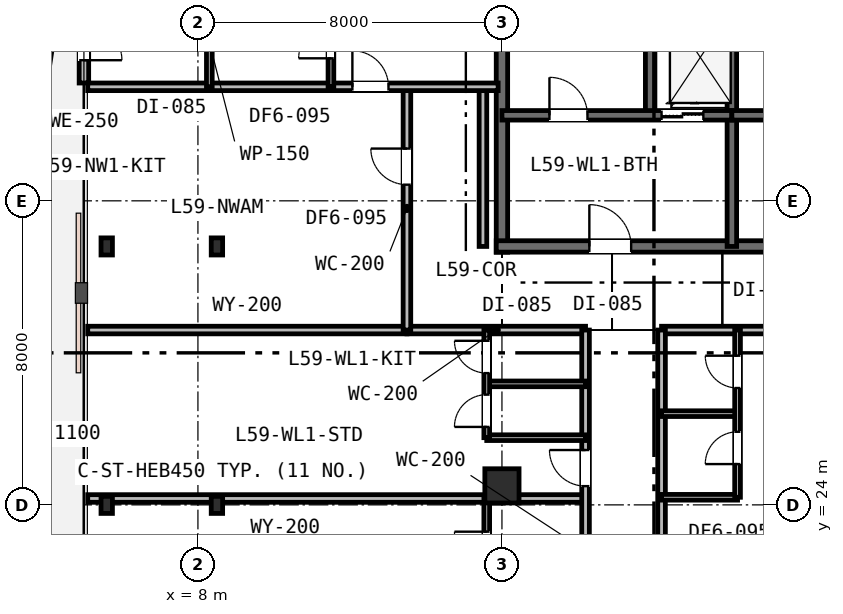
"""IFC4 building model, lengths in metres.
Left out: names, types, materials, properties, quantities, classifications, styles, units other than length and angle.
Written with IfcOpenShell. Run it as: python <this file> out.ifc"""

import sys

from ifc_helpers import new_model, si_unit, direction, frame, frame_2d, origin, origin_2d, place, context, subcontext, project, spatial, rectangle, i_section, extrude, element, fill, save


model = new_model("IFC4")
c1 = context("Model", 3, precision=1e-05, world=origin(), true_north=direction((0.0, 1.0)))
c2 = subcontext(c1, "Body", "Model", "MODEL_VIEW")
j1 = project(units=[si_unit("LENGTHUNIT", "METRE"), si_unit("PLANEANGLEUNIT", "RADIAN")], contexts=[c1])
p1 = place(None, origin())
s1 = spatial("IfcSite", under=j1, at=p1, CompositionType="ELEMENT")
p2 = place(p1, origin())
s2 = spatial("IfcBuilding", under=s1, at=p2, CompositionType="ELEMENT")
p3 = place(p2, frame((0.0, 0.0, 229.8)))
s3 = spatial("IfcBuildingStorey", under=s2, at=p3, CompositionType="ELEMENT", Elevation=229.8)
p4 = place(p3, frame((16.0, 30.65, 0.0), z_axis=(0.0, 0.0, 1.0), x_axis=(0.0, 1.0, 0.0)))
e1 = element("IfcWall", 1, at=p4, inside=s3, PredefinedType="SHEAR", context=c2, shape_type="SweptSolid", body=[
    extrude(rectangle(XDim=12.3, YDim=0.3, at=frame_2d((6.15, 0.0))), origin(), (0.0, 0.0, 1.0), 3.8),
])
p5 = place(p3, frame((15.85, 30.8, 0.0), z_axis=(0.0, 0.0, 1.0), x_axis=(1.0, 0.0, 0.0)))
e2 = element("IfcWall", 2, at=p5, inside=s3, PredefinedType="SHEAR", context=c2, shape_type="SweptSolid", body=[
    extrude(rectangle(XDim=11.2, YDim=0.3, at=frame_2d((5.6, 0.0))), origin(), (0.0, 0.0, 1.0), 3.8),
])
p6 = place(p5, frame((2.45, 0.0, 0.0)))
e3 = element("IfcOpeningElement", 3, at=p6, cuts=e2, PredefinedType="OPENING", context=c2, shape_type="SweptSolid", body=[
    extrude(rectangle(XDim=1.1, YDim=2.15, at=frame_2d((0.55, 1.075))), frame((0.0, 0.16, 0.0), z_axis=(0.0, -1.0, 0.0), x_axis=(1.0, 0.0, 0.0)), (0.0, 0.0, 1.0), 0.32),
])
p7 = place(p3, frame((19.9, 34.25, 0.0), z_axis=(0.0, 0.0, 1.0), x_axis=(0.0, 1.0, 0.0)))
e4 = element("IfcWall", 4, at=p7, inside=s3, PredefinedType="SHEAR", context=c2, shape_type="SweptSolid", body=[
    extrude(rectangle(XDim=8.65, YDim=0.25, at=frame_2d((4.325, 0.0))), origin(), (0.0, 0.0, 1.0), 3.8),
])
p8 = place(p3, frame((22.05, 30.8, 0.0), z_axis=(0.0, 0.0, 1.0), x_axis=(0.0, 1.0, 0.0)))
e5 = element("IfcWall", 5, at=p8, inside=s3, PredefinedType="SHEAR", context=c2, shape_type="SweptSolid", body=[
    extrude(rectangle(XDim=6.45, YDim=0.25, at=frame_2d((3.225, 0.0))), origin(), (0.0, 0.0, 1.0), 3.8),
])
p9 = place(p3, frame((16.0, 34.25, 0.0), z_axis=(0.0, 0.0, 1.0), x_axis=(1.0, 0.0, 0.0)))
e6 = element("IfcWall", 6, at=p9, inside=s3, PredefinedType="SHEAR", context=c2, shape_type="SweptSolid", body=[
    extrude(rectangle(XDim=6.05, YDim=0.25, at=frame_2d((3.025, 0.0))), origin(), (0.0, 0.0, 1.0), 3.8),
])
p10 = place(p9, frame((1.25, 0.0, 0.0)))
e7 = element("IfcOpeningElement", 7, at=p10, cuts=e6, PredefinedType="OPENING", context=c2, shape_type="SweptSolid", body=[
    extrude(rectangle(XDim=1.0, YDim=2.15, at=frame_2d((0.5, 1.075))), frame((0.0, 0.135, 0.0), z_axis=(0.0, -1.0, 0.0), x_axis=(1.0, 0.0, 0.0)), (0.0, 0.0, 1.0), 0.27),
])
p11 = place(p9, frame((4.2, 0.0, 0.0)))
e8 = element("IfcOpeningElement", 8, at=p11, cuts=e6, PredefinedType="OPENING", context=c2, shape_type="SweptSolid", body=[
    extrude(rectangle(XDim=1.1, YDim=2.15, at=frame_2d((0.55, 1.075))), frame((0.0, 0.135, 0.0), z_axis=(0.0, -1.0, 0.0), x_axis=(1.0, 0.0, 0.0)), (0.0, 0.0, 1.0), 0.27),
])
p12 = place(p3, frame((22.05, 34.25, 0.0), z_axis=(0.0, 0.0, 1.0), x_axis=(1.0, 0.0, 0.0)))
e9 = element("IfcWall", 9, at=p12, inside=s3, PredefinedType="SHEAR", context=c2, shape_type="SweptSolid", body=[
    extrude(rectangle(XDim=5.0, YDim=0.25, at=frame_2d((2.5, 0.0))), origin(), (0.0, 0.0, 1.0), 3.8),
])
p13 = place(p12, frame((1.95, 0.0, 0.0)))
e10 = element("IfcOpeningElement", 10, at=p13, cuts=e9, PredefinedType="OPENING", context=c2, shape_type="SweptSolid", body=[
    extrude(rectangle(XDim=1.0, YDim=2.15, at=frame_2d((0.5, 1.075))), frame((0.0, 0.135, 0.0), z_axis=(0.0, -1.0, 0.0), x_axis=(1.0, 0.0, 0.0)), (0.0, 0.0, 1.0), 0.27),
])
p14 = place(p3, frame((8.5, 24.0, 0.0), z_axis=(0.0, 0.0, 1.0), x_axis=(1.0, 0.0, 0.0)))
e11 = element("IfcColumn", 11, at=p14, inside=s3, PredefinedType="COLUMN", context=c2, shape_type="SweptSolid", body=[
    extrude(i_section(OverallWidth=0.3, OverallDepth=0.45, WebThickness=0.014, FlangeThickness=0.026, FilletRadius=0.027, at=origin_2d()), origin(), (0.0, 0.0, 1.0), 3.8),
])
p15 = place(p3, frame((16.0, 24.5, 0.0), z_axis=(0.0, 0.0, 1.0), x_axis=(1.0, 0.0, 0.0)))
e12 = element("IfcColumn", 12, at=p15, inside=s3, PredefinedType="COLUMN", context=c2, shape_type="SweptSolid", body=[
    extrude(rectangle(XDim=0.9, YDim=0.9, at=origin_2d()), origin(), (0.0, 0.0, 1.0), 3.8),
])
for number, where, z_axis, x_axis in (
    (13, (5.6, 24.0, 0.0), (0.0, 0.0, 1.0), (1.0, 0.0, 0.0)),
    (14, (5.6, 30.8, 0.0), (0.0, 0.0, 1.0), (1.0, 0.0, 0.0)),
    (15, (8.5, 30.8, 0.0), (0.0, 0.0, 1.0), (1.0, 0.0, 0.0)),
):
    element("IfcColumn", number, at=place(p3, frame(where, z_axis=z_axis, x_axis=x_axis)), inside=s3, PredefinedType="COLUMN", context=c2, shape_type="SweptSolid", body=[
        extrude(i_section(OverallWidth=0.3, OverallDepth=0.45, WebThickness=0.014, FlangeThickness=0.026, FilletRadius=0.027, at=origin_2d()), origin(), (0.0, 0.0, 1.0), 3.8),
    ])
p16 = place(p3, frame((5.0, 37.3, 0.0), z_axis=(0.0, 0.0, 1.0), x_axis=(0.0, -1.0, 0.0)))
e16 = element("IfcWall", 16, at=p16, inside=s3, PredefinedType="STANDARD", context=c2, shape_type="SweptSolid", body=[
    extrude(rectangle(XDim=2.2, YDim=0.25, at=frame_2d((1.1, 0.0))), origin(), (0.0, 0.0, 1.0), 3.53),
])
p17 = place(p16, frame((0.6, 0.0, 0.0)))
e17 = element("IfcOpeningElement", 17, at=p17, cuts=e16, PredefinedType="OPENING", context=c2, shape_type="SweptSolid", body=[
    extrude(rectangle(XDim=1.0, YDim=2.15, at=frame_2d((0.5, 1.075))), frame((0.0, 0.135, 0.0), z_axis=(0.0, -1.0, 0.0), x_axis=(1.0, 0.0, 0.0)), (0.0, 0.0, 1.0), 0.27),
])
p18 = place(p3, frame((5.1, 28.6, 0.0), z_axis=(0.0, 0.0, 1.0), x_axis=(1.0, 0.0, 0.0)))
e18 = element("IfcWall", 18, at=p18, inside=s3, PredefinedType="PARTITIONING", context=c2, shape_type="SweptSolid", body=[
    extrude(rectangle(XDim=8.4, YDim=0.2, at=frame_2d((4.2, 0.0))), origin(), (0.0, 0.0, 1.0), 2.92),
])
p19 = place(p3, frame((13.5, 28.6, 0.0), z_axis=(0.0, 0.0, 1.0), x_axis=(1.0, 0.0, 0.0)))
e19 = element("IfcWall", 19, at=p19, inside=s3, PredefinedType="PARTITIONING", context=c2, shape_type="SweptSolid", body=[
    extrude(rectangle(XDim=4.7, YDim=0.2, at=frame_2d((2.35, 0.0))), origin(), (0.0, 0.0, 1.0), 2.92),
])
p20 = place(p3, frame((20.2, 28.6, 0.0), z_axis=(0.0, 0.0, 1.0), x_axis=(1.0, 0.0, 0.0)))
e20 = element("IfcWall", 20, at=p20, inside=s3, PredefinedType="PARTITIONING", context=c2, shape_type="SweptSolid", body=[
    extrude(rectangle(XDim=25.7, YDim=0.2, at=frame_2d((12.85, 0.0))), origin(), (0.0, 0.0, 1.0), 2.92),
])
p21 = place(p20, frame((4.475, 0.0, 0.0)))
e21 = element("IfcOpeningElement", 21, at=p21, cuts=e20, PredefinedType="OPENING", context=c2, shape_type="SweptSolid", body=[
    extrude(rectangle(XDim=0.95, YDim=2.15, at=frame_2d((0.475, 1.075))), frame((0.0, 0.11, 0.0), z_axis=(0.0, -1.0, 0.0), x_axis=(1.0, 0.0, 0.0)), (0.0, 0.0, 1.0), 0.22),
])
p22 = place(p20, frame((10.875, 0.0, 0.0)))
e22 = element("IfcOpeningElement", 22, at=p22, cuts=e20, PredefinedType="OPENING", context=c2, shape_type="SweptSolid", body=[
    extrude(rectangle(XDim=0.95, YDim=2.15, at=frame_2d((0.475, 1.075))), frame((0.0, 0.11, 0.0), z_axis=(0.0, -1.0, 0.0), x_axis=(1.0, 0.0, 0.0)), (0.0, 0.0, 1.0), 0.22),
])
p23 = place(p20, frame((17.854, 0.0, 0.0)))
e23 = element("IfcOpeningElement", 23, at=p23, cuts=e20, PredefinedType="OPENING", context=c2, shape_type="SweptSolid", body=[
    extrude(rectangle(XDim=0.95, YDim=2.15, at=frame_2d((0.475, 1.075))), frame((0.0, 0.11, 0.0), z_axis=(0.0, -1.0, 0.0), x_axis=(1.0, 0.0, 0.0)), (0.0, 0.0, 1.0), 0.22),
])
p24 = place(p3, frame((15.5, 30.8, 0.0), z_axis=(0.0, 0.0, 1.0), x_axis=(0.0, 1.0, 0.0)))
e24 = element("IfcWall", 24, at=p24, inside=s3, PredefinedType="PARTITIONING", context=c2, shape_type="SweptSolid", body=[
    extrude(rectangle(XDim=4.2, YDim=0.2, at=frame_2d((2.1, 0.0))), origin(), (0.0, 0.0, 1.0), 2.92),
])
p25 = place(p3, frame((13.5, 28.6, 0.0), z_axis=(0.0, 0.0, 1.0), x_axis=(0.0, 1.0, 0.0)))
e25 = element("IfcWall", 25, at=p25, inside=s3, PredefinedType="PARTITIONING", context=c2, shape_type="SweptSolid", body=[
    extrude(rectangle(XDim=6.4, YDim=0.2, at=frame_2d((3.2, 0.0))), origin(), (0.0, 0.0, 1.0), 2.92),
])
p26 = place(p25, frame((3.825, 0.0, 0.0)))
e26 = element("IfcOpeningElement", 26, at=p26, cuts=e25, PredefinedType="OPENING", context=c2, shape_type="SweptSolid", body=[
    extrude(rectangle(XDim=0.95, YDim=2.15, at=frame_2d((0.475, 1.075))), frame((0.0, 0.11, 0.0), z_axis=(0.0, -1.0, 0.0), x_axis=(1.0, 0.0, 0.0)), (0.0, 0.0, 1.0), 0.22),
])
p27 = place(p3, frame((5.1, 35.0, 0.0), z_axis=(0.0, 0.0, 1.0), x_axis=(1.0, 0.0, 0.0)))
e27 = element("IfcWall", 27, at=p27, inside=s3, PredefinedType="PARTITIONING", context=c2, shape_type="SweptSolid", body=[
    extrude(rectangle(XDim=10.8, YDim=0.2, at=frame_2d((5.4, 0.0))), origin(), (0.0, 0.0, 1.0), 3.24),
])
p28 = place(p27, frame((6.964, 0.0, 0.0)))
e28 = element("IfcOpeningElement", 28, at=p28, cuts=e27, PredefinedType="OPENING", context=c2, shape_type="SweptSolid", body=[
    extrude(rectangle(XDim=0.95, YDim=2.15, at=frame_2d((0.475, 1.075))), frame((0.0, 0.11, 0.0), z_axis=(0.0, -1.0, 0.0), x_axis=(1.0, 0.0, 0.0)), (0.0, 0.0, 1.0), 0.22),
])
p29 = place(p3, frame((11.5, 35.0, 0.0), z_axis=(0.0, 0.0, 1.0), x_axis=(0.0, 1.0, 0.0)))
e29 = element("IfcWall", 29, at=p29, inside=s3, PredefinedType="PARTITIONING", context=c2, shape_type="SweptSolid", body=[
    extrude(rectangle(XDim=2.35, YDim=0.15, at=frame_2d((1.175, 0.0))), origin(), (0.0, 0.0, 1.0), 3.53),
])
p30 = place(p29, frame((0.75, 0.0, 0.0)))
e30 = element("IfcOpeningElement", 30, at=p30, cuts=e29, PredefinedType="OPENING", context=c2, shape_type="SweptSolid", body=[
    extrude(rectangle(XDim=0.85, YDim=2.15, at=frame_2d((0.425, 1.075))), frame((0.0, 0.085, 0.0), z_axis=(0.0, -1.0, 0.0), x_axis=(1.0, 0.0, 0.0)), (0.0, 0.0, 1.0), 0.17),
])
p31 = place(p3, frame((8.3, 35.0, 0.0), z_axis=(0.0, 0.0, 1.0), x_axis=(0.0, 1.0, 0.0)))
e31 = element("IfcWall", 31, at=p31, inside=s3, PredefinedType="PARTITIONING", context=c2, shape_type="SweptSolid", body=[
    extrude(rectangle(XDim=2.35, YDim=0.15, at=frame_2d((1.175, 0.0))), origin(), (0.0, 0.0, 1.0), 3.53),
])
p32 = place(p3, frame((5.1, 24.168, 0.0), z_axis=(0.0, 0.0, 1.0), x_axis=(1.0, 0.0, 0.0)))
e32 = element("IfcWall", 32, at=p32, inside=s3, PredefinedType="PARTITIONING", context=c2, shape_type="SweptSolid", body=[
    extrude(rectangle(XDim=13.1, YDim=0.2, at=frame_2d((6.55, 0.0))), origin(), (0.0, 0.0, 1.0), 2.92),
])
p33 = place(p3, frame((18.2, 17.0, 0.0), z_axis=(0.0, 0.0, 1.0), x_axis=(0.0, 1.0, 0.0)))
e33 = element("IfcWall", 33, at=p33, inside=s3, PredefinedType="PARTITIONING", context=c2, shape_type="SweptSolid", body=[
    extrude(rectangle(XDim=11.6, YDim=0.2, at=frame_2d((5.8, 0.0))), origin(), (0.0, 0.0, 1.0), 2.92),
])
p34 = place(p33, frame((7.493, 0.0, 0.0)))
e34 = element("IfcOpeningElement", 34, at=p34, cuts=e33, PredefinedType="OPENING", context=c2, shape_type="SweptSolid", body=[
    extrude(rectangle(XDim=0.95, YDim=2.15, at=frame_2d((0.475, 1.075))), frame((0.0, 0.11, 0.0), z_axis=(0.0, -1.0, 0.0), x_axis=(1.0, 0.0, 0.0)), (0.0, 0.0, 1.0), 0.22),
])
p35 = place(p33, frame((0.909, 0.0, 0.0)))
e35 = element("IfcOpeningElement", 35, at=p35, cuts=e33, PredefinedType="OPENING", context=c2, shape_type="SweptSolid", body=[
    extrude(rectangle(XDim=0.95, YDim=2.15, at=frame_2d((0.475, 1.075))), frame((0.0, 0.11, 0.0), z_axis=(0.0, -1.0, 0.0), x_axis=(1.0, 0.0, 0.0)), (0.0, 0.0, 1.0), 0.22),
])
for number, where, z_axis, x_axis in (
    (36, (15.6, 25.768, 0.0), (0.0, 0.0, 1.0), (1.0, 0.0, 0.0)),
    (37, (15.6, 27.184, 0.0), (0.0, 0.0, 1.0), (1.0, 0.0, 0.0)),
):
    element("IfcWall", number, at=place(p3, frame(where, z_axis=z_axis, x_axis=x_axis)), inside=s3, PredefinedType="PARTITIONING", context=c2, shape_type="SweptSolid", body=[
        extrude(rectangle(XDim=2.6, YDim=0.15, at=frame_2d((1.3, 0.0))), origin(), (0.0, 0.0, 1.0), 2.92),
    ])
p36 = place(p3, frame((15.6, 25.768, 0.0), z_axis=(0.0, 0.0, 1.0), x_axis=(0.0, 1.0, 0.0)))
e38 = element("IfcWall", 38, at=p36, inside=s3, PredefinedType="PARTITIONING", context=c2, shape_type="SweptSolid", body=[
    extrude(rectangle(XDim=2.832, YDim=0.15, at=frame_2d((1.416, 0.0))), origin(), (0.0, 0.0, 1.0), 2.92),
])
p37 = place(p36, frame((0.283, 0.0, 0.0)))
e39 = element("IfcOpeningElement", 39, at=p37, cuts=e38, PredefinedType="OPENING", context=c2, shape_type="SweptSolid", body=[
    extrude(rectangle(XDim=0.85, YDim=2.15, at=frame_2d((0.425, 1.075))), frame((0.0, 0.085, 0.0), z_axis=(0.0, -1.0, 0.0), x_axis=(1.0, 0.0, 0.0)), (0.0, 0.0, 1.0), 0.17),
])
p38 = place(p36, frame((1.699, 0.0, 0.0)))
e40 = element("IfcOpeningElement", 40, at=p38, cuts=e38, PredefinedType="OPENING", context=c2, shape_type="SweptSolid", body=[
    extrude(rectangle(XDim=0.85, YDim=2.15, at=frame_2d((0.425, 1.075))), frame((0.0, 0.085, 0.0), z_axis=(0.0, -1.0, 0.0), x_axis=(1.0, 0.0, 0.0)), (0.0, 0.0, 1.0), 0.17),
])
p39 = place(p3, frame((15.6, 19.768, 0.0), z_axis=(0.0, 0.0, 1.0), x_axis=(0.0, 1.0, 0.0)))
e41 = element("IfcWall", 41, at=p39, inside=s3, PredefinedType="PARTITIONING", context=c2, shape_type="SweptSolid", body=[
    extrude(rectangle(XDim=4.4, YDim=0.15, at=frame_2d((2.2, 0.0))), origin(), (0.0, 0.0, 1.0), 2.92),
])
p40 = place(p39, frame((0.675, 0.0, 0.0)))
e42 = element("IfcOpeningElement", 42, at=p40, cuts=e41, PredefinedType="OPENING", context=c2, shape_type="SweptSolid", body=[
    extrude(rectangle(XDim=0.85, YDim=2.15, at=frame_2d((0.425, 1.075))), frame((0.0, 0.085, 0.0), z_axis=(0.0, -1.0, 0.0), x_axis=(1.0, 0.0, 0.0)), (0.0, 0.0, 1.0), 0.17),
])
p41 = place(p39, frame((2.677, 0.0, 0.0)))
e43 = element("IfcOpeningElement", 43, at=p41, cuts=e41, PredefinedType="OPENING", context=c2, shape_type="SweptSolid", body=[
    extrude(rectangle(XDim=0.85, YDim=2.15, at=frame_2d((0.425, 1.075))), frame((0.0, 0.085, 0.0), z_axis=(0.0, -1.0, 0.0), x_axis=(1.0, 0.0, 0.0)), (0.0, 0.0, 1.0), 0.17),
])
p42 = place(p3, frame((20.2, 17.0, 0.0), z_axis=(0.0, 0.0, 1.0), x_axis=(0.0, 1.0, 0.0)))
e44 = element("IfcWall", 44, at=p42, inside=s3, PredefinedType="PARTITIONING", context=c2, shape_type="SweptSolid", body=[
    extrude(rectangle(XDim=11.6, YDim=0.2, at=frame_2d((5.8, 0.0))), origin(), (0.0, 0.0, 1.0), 2.92),
])
p43 = place(p42, frame((3.125, 0.0, 0.0)))
e45 = element("IfcOpeningElement", 45, at=p43, cuts=e44, PredefinedType="OPENING", context=c2, shape_type="SweptSolid", body=[
    extrude(rectangle(XDim=0.95, YDim=2.15, at=frame_2d((0.475, 1.075))), frame((0.0, 0.11, 0.0), z_axis=(0.0, -1.0, 0.0), x_axis=(1.0, 0.0, 0.0)), (0.0, 0.0, 1.0), 0.22),
])
p44 = place(p3, frame((20.2, 24.2, 0.0), z_axis=(0.0, 0.0, 1.0), x_axis=(1.0, 0.0, 0.0)))
e46 = element("IfcWall", 46, at=p44, inside=s3, PredefinedType="PARTITIONING", context=c2, shape_type="SweptSolid", body=[
    extrude(rectangle(XDim=2.0, YDim=0.15, at=frame_2d((1.0, 0.0))), origin(), (0.0, 0.0, 1.0), 2.92),
])
p45 = place(p3, frame((20.2, 26.4, 0.0), z_axis=(0.0, 0.0, 1.0), x_axis=(1.0, 0.0, 0.0)))
e47 = element("IfcWall", 47, at=p45, inside=s3, PredefinedType="PARTITIONING", context=c2, shape_type="SweptSolid", body=[
    extrude(rectangle(XDim=2.0, YDim=0.15, at=frame_2d((1.0, 0.0))), origin(), (0.0, 0.0, 1.0), 3.22),
])
p46 = place(p3, frame((22.2, 24.2, 0.0), z_axis=(0.0, 0.0, 1.0), x_axis=(0.0, 1.0, 0.0)))
e48 = element("IfcWall", 48, at=p46, inside=s3, PredefinedType="PARTITIONING", context=c2, shape_type="SweptSolid", body=[
    extrude(rectangle(XDim=4.4, YDim=0.15, at=frame_2d((2.2, 0.0))), origin(), (0.0, 0.0, 1.0), 2.92),
])
p47 = place(p46, frame((0.873, 0.0, 0.0)))
e49 = element("IfcOpeningElement", 49, at=p47, cuts=e48, PredefinedType="OPENING", context=c2, shape_type="SweptSolid", body=[
    extrude(rectangle(XDim=0.85, YDim=2.15, at=frame_2d((0.425, 1.075))), frame((0.0, 0.085, 0.0), z_axis=(0.0, -1.0, 0.0), x_axis=(1.0, 0.0, 0.0)), (0.0, 0.0, 1.0), 0.17),
])
p48 = place(p46, frame((2.875, 0.0, 0.0)))
e50 = element("IfcOpeningElement", 50, at=p48, cuts=e48, PredefinedType="OPENING", context=c2, shape_type="SweptSolid", body=[
    extrude(rectangle(XDim=0.85, YDim=2.15, at=frame_2d((0.425, 1.075))), frame((0.0, 0.085, 0.0), z_axis=(0.0, -1.0, 0.0), x_axis=(1.0, 0.0, 0.0)), (0.0, 0.0, 1.0), 0.17),
])
p49 = place(p17, origin())
e51 = element("IfcDoor", 51, at=p49, inside=s3, OperationType="SINGLE_SWING_RIGHT", PredefinedType="DOOR", context=c2, shape_type="SweptSolid", body=[
    extrude(rectangle(XDim=1.0, YDim=2.15, at=frame_2d((0.5, 1.075))), frame((0.0, 0.025, 0.0), z_axis=(0.0, -1.0, 0.0), x_axis=(1.0, 0.0, 0.0)), (0.0, 0.0, 1.0), 0.05),
])
fill(e17, e51)
p50 = place(p10, origin())
e52 = element("IfcDoor", 52, at=p50, inside=s3, OperationType="SINGLE_SWING_LEFT", PredefinedType="DOOR", context=c2, shape_type="SweptSolid", body=[
    extrude(rectangle(XDim=1.0, YDim=2.15, at=frame_2d((0.5, 1.075))), frame((0.0, 0.025, 0.0), z_axis=(0.0, -1.0, 0.0), x_axis=(1.0, 0.0, 0.0)), (0.0, 0.0, 1.0), 0.05),
])
fill(e7, e52)
p51 = place(p6, origin())
e53 = element("IfcDoor", 53, at=p51, inside=s3, OperationType="SINGLE_SWING_LEFT", PredefinedType="DOOR", context=c2, shape_type="SweptSolid", body=[
    extrude(rectangle(XDim=1.1, YDim=2.15, at=frame_2d((0.55, 1.075))), frame((0.0, 0.025, 0.0), z_axis=(0.0, -1.0, 0.0), x_axis=(1.0, 0.0, 0.0)), (0.0, 0.0, 1.0), 0.05),
])
fill(e3, e53)
p52 = place(p26, origin())
e54 = element("IfcDoor", 54, at=p52, inside=s3, OperationType="SINGLE_SWING_RIGHT", PredefinedType="DOOR", context=c2, shape_type="SweptSolid", body=[
    extrude(rectangle(XDim=0.95, YDim=2.15, at=frame_2d((0.475, 1.075))), frame((0.0, 0.025, 0.0), z_axis=(0.0, -1.0, 0.0), x_axis=(1.0, 0.0, 0.0)), (0.0, 0.0, 1.0), 0.05),
])
fill(e26, e54)
p53 = place(p28, origin())
e55 = element("IfcDoor", 55, at=p53, inside=s3, OperationType="SINGLE_SWING_LEFT", PredefinedType="DOOR", context=c2, shape_type="SweptSolid", body=[
    extrude(rectangle(XDim=0.95, YDim=2.15, at=frame_2d((0.475, 1.075))), frame((0.0, 0.025, 0.0), z_axis=(0.0, -1.0, 0.0), x_axis=(1.0, 0.0, 0.0)), (0.0, 0.0, 1.0), 0.05),
])
fill(e28, e55)
p54 = place(p30, origin())
e56 = element("IfcDoor", 56, at=p54, inside=s3, OperationType="SINGLE_SWING_LEFT", PredefinedType="DOOR", context=c2, shape_type="SweptSolid", body=[
    extrude(rectangle(XDim=0.85, YDim=2.15, at=frame_2d((0.425, 1.075))), frame((0.0, 0.025, 0.0), z_axis=(0.0, -1.0, 0.0), x_axis=(1.0, 0.0, 0.0)), (0.0, 0.0, 1.0), 0.05),
])
fill(e30, e56)
p55 = place(p34, origin())
e57 = element("IfcDoor", 57, at=p55, inside=s3, OperationType="SINGLE_SWING_RIGHT", PredefinedType="DOOR", context=c2, shape_type="SweptSolid", body=[
    extrude(rectangle(XDim=0.95, YDim=2.15, at=frame_2d((0.475, 1.075))), frame((0.0, 0.025, 0.0), z_axis=(0.0, -1.0, 0.0), x_axis=(1.0, 0.0, 0.0)), (0.0, 0.0, 1.0), 0.05),
])
fill(e34, e57)
p56 = place(p37, origin())
e58 = element("IfcDoor", 58, at=p56, inside=s3, OperationType="SINGLE_SWING_LEFT", PredefinedType="DOOR", context=c2, shape_type="SweptSolid", body=[
    extrude(rectangle(XDim=0.85, YDim=2.15, at=frame_2d((0.425, 1.075))), frame((0.0, 0.025, 0.0), z_axis=(0.0, -1.0, 0.0), x_axis=(1.0, 0.0, 0.0)), (0.0, 0.0, 1.0), 0.05),
])
fill(e39, e58)
p57 = place(p38, origin())
e59 = element("IfcDoor", 59, at=p57, inside=s3, OperationType="SINGLE_SWING_RIGHT", PredefinedType="DOOR", context=c2, shape_type="SweptSolid", body=[
    extrude(rectangle(XDim=0.85, YDim=2.15, at=frame_2d((0.425, 1.075))), frame((0.0, 0.025, 0.0), z_axis=(0.0, -1.0, 0.0), x_axis=(1.0, 0.0, 0.0)), (0.0, 0.0, 1.0), 0.05),
])
fill(e40, e59)
p58 = place(p41, origin())
e60 = element("IfcDoor", 60, at=p58, inside=s3, OperationType="SINGLE_SWING_RIGHT", PredefinedType="DOOR", context=c2, shape_type="SweptSolid", body=[
    extrude(rectangle(XDim=0.85, YDim=2.15, at=frame_2d((0.425, 1.075))), frame((0.0, 0.025, 0.0), z_axis=(0.0, -1.0, 0.0), x_axis=(1.0, 0.0, 0.0)), (0.0, 0.0, 1.0), 0.05),
])
fill(e43, e60)
p59 = place(p47, origin())
e61 = element("IfcDoor", 61, at=p59, inside=s3, OperationType="SINGLE_SWING_LEFT", PredefinedType="DOOR", context=c2, shape_type="SweptSolid", body=[
    extrude(rectangle(XDim=0.85, YDim=2.15, at=frame_2d((0.425, 1.075))), frame((0.0, 0.025, 0.0), z_axis=(0.0, -1.0, 0.0), x_axis=(1.0, 0.0, 0.0)), (0.0, 0.0, 1.0), 0.05),
])
fill(e49, e61)
p60 = place(p48, origin())
e62 = element("IfcDoor", 62, at=p60, inside=s3, OperationType="SINGLE_SWING_RIGHT", PredefinedType="DOOR", context=c2, shape_type="SweptSolid", body=[
    extrude(rectangle(XDim=0.85, YDim=2.15, at=frame_2d((0.425, 1.075))), frame((0.0, 0.025, 0.0), z_axis=(0.0, -1.0, 0.0), x_axis=(1.0, 0.0, 0.0)), (0.0, 0.0, 1.0), 0.05),
])
fill(e50, e62)
p61 = place(p11, origin())
e63 = element("IfcDoor", 63, at=p61, inside=s3, OperationType="DOUBLE_DOOR_SLIDING", PredefinedType="DOOR", context=c2, shape_type="SweptSolid", body=[
    extrude(rectangle(XDim=1.1, YDim=2.15, at=frame_2d((0.55, 1.075))), frame((0.0, 0.025, 0.0), z_axis=(0.0, -1.0, 0.0), x_axis=(1.0, 0.0, 0.0)), (0.0, 0.0, 1.0), 0.05),
])
fill(e8, e63)
save(model, sys.argv[1])
